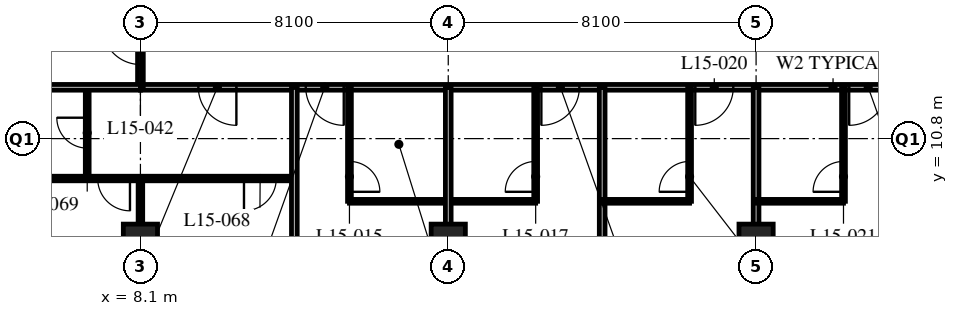
"""IFC4 building model, lengths in metres.
Left out: names, types, materials, properties, quantities, classifications, styles, units other than length and angle.
Written with IfcOpenShell. Run it as: python <this file> out.ifc"""

import sys

from ifc_helpers import new_model, si_unit, direction, frame, frame_2d, origin, origin_2d, place, context, subcontext, project, spatial, rectangle, hollow_rectangle, extrude, element, fill, save


model = new_model("IFC4")
c1 = context("Model", 3, precision=1e-05, world=origin(), true_north=direction((0.0, 1.0)))
c2 = subcontext(c1, "Body", "Model", "MODEL_VIEW")
j1 = project(units=[si_unit("LENGTHUNIT", "METRE"), si_unit("PLANEANGLEUNIT", "RADIAN")], contexts=[c1])
p1 = place(None, origin())
s1 = spatial("IfcSite", under=j1, at=p1, CompositionType="ELEMENT")
p2 = place(p1, origin())
s2 = spatial("IfcBuilding", under=s1, at=p2, CompositionType="ELEMENT")
p3 = place(p2, frame((0.0, 0.0, 63.6)))
s3 = spatial("IfcBuildingStorey", under=s2, at=p3, CompositionType="ELEMENT", Elevation=63.6)
for number, where, z_axis, x_axis in (
    (1, (8.1, 8.1, 0.0), (0.0, 0.0, 1.0), (1.0, 0.0, 0.0)),
    (2, (16.2, 8.1, 0.0), (0.0, 0.0, 1.0), (1.0, 0.0, 0.0)),
    (3, (24.3, 8.1, 0.0), (0.0, 0.0, 1.0), (1.0, 0.0, 0.0)),
):
    element("IfcColumn", number, at=place(p3, frame(where, z_axis=z_axis, x_axis=x_axis)), inside=s3, PredefinedType="COLUMN", context=c2, shape_type="SweptSolid", body=[
        extrude(hollow_rectangle(XDim=0.9, YDim=0.9, WallThickness=0.09, at=origin_2d()), origin(), (0.0, 0.0, 1.0), 3.4),
    ])
p4 = place(p3, frame((8.1, 12.15, 0.0), z_axis=(0.0, 0.0, 1.0), x_axis=(1.0, 0.0, 0.0)))
e4 = element("IfcWall", 4, at=p4, inside=s3, PredefinedType="PARTITIONING", context=c2, shape_type="SweptSolid", body=[
    extrude(rectangle(XDim=36.45, YDim=0.15, at=frame_2d((18.225, 0.0))), origin(), (0.0, 0.0, 1.0), 3.19),
])
p5 = place(p4, frame((4.35, 0.0, 0.0)))
e5 = element("IfcOpeningElement", 5, at=p5, cuts=e4, PredefinedType="OPENING", context=c2, shape_type="SweptSolid", body=[
    extrude(rectangle(XDim=1.0, YDim=2.1, at=frame_2d((0.5, 1.05))), frame((0.0, 0.085, 0.0), z_axis=(0.0, -1.0, 0.0), x_axis=(1.0, 0.0, 0.0)), (0.0, 0.0, 1.0), 0.17),
])
p6 = place(p4, frame((10.55, 0.0, 0.0)))
e6 = element("IfcOpeningElement", 6, at=p6, cuts=e4, PredefinedType="OPENING", context=c2, shape_type="SweptSolid", body=[
    extrude(rectangle(XDim=1.0, YDim=2.1, at=frame_2d((0.5, 1.05))), frame((0.0, 0.085, 0.0), z_axis=(0.0, -1.0, 0.0), x_axis=(1.0, 0.0, 0.0)), (0.0, 0.0, 1.0), 0.17),
])
p7 = place(p4, frame((14.6, 0.0, 0.0)))
e7 = element("IfcOpeningElement", 7, at=p7, cuts=e4, PredefinedType="OPENING", context=c2, shape_type="SweptSolid", body=[
    extrude(rectangle(XDim=1.0, YDim=2.1, at=frame_2d((0.5, 1.05))), frame((0.0, 0.085, 0.0), z_axis=(0.0, -1.0, 0.0), x_axis=(1.0, 0.0, 0.0)), (0.0, 0.0, 1.0), 0.17),
])
p8 = place(p4, frame((18.65, 0.0, 0.0)))
e8 = element("IfcOpeningElement", 8, at=p8, cuts=e4, PredefinedType="OPENING", context=c2, shape_type="SweptSolid", body=[
    extrude(rectangle(XDim=1.0, YDim=2.1, at=frame_2d((0.5, 1.05))), frame((0.0, 0.085, 0.0), z_axis=(0.0, -1.0, 0.0), x_axis=(1.0, 0.0, 0.0)), (0.0, 0.0, 1.0), 0.17),
])
p9 = place(p4, frame((22.7, 0.0, 0.0)))
e9 = element("IfcOpeningElement", 9, at=p9, cuts=e4, PredefinedType="OPENING", context=c2, shape_type="SweptSolid", body=[
    extrude(rectangle(XDim=1.0, YDim=2.1, at=frame_2d((0.5, 1.05))), frame((0.0, 0.085, 0.0), z_axis=(0.0, -1.0, 0.0), x_axis=(1.0, 0.0, 0.0)), (0.0, 0.0, 1.0), 0.17),
])
p10 = place(p4, frame((24.6, 0.0, 0.0)))
e10 = element("IfcOpeningElement", 10, at=p10, cuts=e4, PredefinedType="OPENING", context=c2, shape_type="SweptSolid", body=[
    extrude(rectangle(XDim=1.0, YDim=2.1, at=frame_2d((0.5, 1.05))), frame((0.0, 0.085, 0.0), z_axis=(0.0, -1.0, 0.0), x_axis=(1.0, 0.0, 0.0)), (0.0, 0.0, 1.0), 0.17),
])
p11 = place(p4, frame((30.8, 0.0, 0.0)))
e11 = element("IfcOpeningElement", 11, at=p11, cuts=e4, PredefinedType="OPENING", context=c2, shape_type="SweptSolid", body=[
    extrude(rectangle(XDim=1.0, YDim=2.1, at=frame_2d((0.5, 1.05))), frame((0.0, 0.085, 0.0), z_axis=(0.0, -1.0, 0.0), x_axis=(1.0, 0.0, 0.0)), (0.0, 0.0, 1.0), 0.17),
])
p12 = place(p4, frame((1.525, 0.0, 0.0)))
e12 = element("IfcOpeningElement", 12, at=p12, cuts=e4, PredefinedType="OPENING", context=c2, shape_type="SweptSolid", body=[
    extrude(rectangle(XDim=1.0, YDim=2.1, at=frame_2d((0.5, 1.05))), frame((0.0, 0.085, 0.0), z_axis=(0.0, -1.0, 0.0), x_axis=(1.0, 0.0, 0.0)), (0.0, 0.0, 1.0), 0.17),
])
p13 = place(p4, frame((33.925, 0.0, 0.0)))
e13 = element("IfcOpeningElement", 13, at=p13, cuts=e4, PredefinedType="OPENING", context=c2, shape_type="SweptSolid", body=[
    extrude(rectangle(XDim=1.0, YDim=2.1, at=frame_2d((0.5, 1.05))), frame((0.0, 0.085, 0.0), z_axis=(0.0, -1.0, 0.0), x_axis=(1.0, 0.0, 0.0)), (0.0, 0.0, 1.0), 0.17),
])
p14 = place(p3, frame((8.1, 12.15, 0.0), z_axis=(0.0, 0.0, 1.0), x_axis=(0.0, 1.0, 0.0)))
e14 = element("IfcWall", 14, at=p14, inside=s3, PredefinedType="PARTITIONING", context=c2, shape_type="SweptSolid", body=[
    extrude(rectangle(XDim=30.15, YDim=0.15, at=frame_2d((15.075, 0.0))), origin(), (0.0, 0.0, 1.0), 2.578),
])
p15 = place(p14, frame((0.6, 0.0, 0.0)))
e15 = element("IfcOpeningElement", 15, at=p15, cuts=e14, PredefinedType="OPENING", context=c2, shape_type="SweptSolid", body=[
    extrude(rectangle(XDim=1.0, YDim=2.1, at=frame_2d((0.5, 1.05))), frame((0.0, 0.085, 0.0), z_axis=(0.0, -1.0, 0.0), x_axis=(1.0, 0.0, 0.0)), (0.0, 0.0, 1.0), 0.17),
])
p16 = place(p14, frame((6.8, 0.0, 0.0)))
e16 = element("IfcOpeningElement", 16, at=p16, cuts=e14, PredefinedType="OPENING", context=c2, shape_type="SweptSolid", body=[
    extrude(rectangle(XDim=1.0, YDim=2.1, at=frame_2d((0.5, 1.05))), frame((0.0, 0.085, 0.0), z_axis=(0.0, -1.0, 0.0), x_axis=(1.0, 0.0, 0.0)), (0.0, 0.0, 1.0), 0.17),
])
p17 = place(p14, frame((8.7, 0.0, 0.0)))
e17 = element("IfcOpeningElement", 17, at=p17, cuts=e14, PredefinedType="OPENING", context=c2, shape_type="SweptSolid", body=[
    extrude(rectangle(XDim=1.0, YDim=2.1, at=frame_2d((0.5, 1.05))), frame((0.0, 0.085, 0.0), z_axis=(0.0, -1.0, 0.0), x_axis=(1.0, 0.0, 0.0)), (0.0, 0.0, 1.0), 0.17),
])
p18 = place(p14, frame((14.6, 0.0, 0.0)))
e18 = element("IfcOpeningElement", 18, at=p18, cuts=e14, PredefinedType="OPENING", context=c2, shape_type="SweptSolid", body=[
    extrude(rectangle(XDim=1.0, YDim=2.1, at=frame_2d((0.5, 1.05))), frame((0.0, 0.085, 0.0), z_axis=(0.0, -1.0, 0.0), x_axis=(1.0, 0.0, 0.0)), (0.0, 0.0, 1.0), 0.17),
])
p19 = place(p14, frame((21.65, 0.0, 0.0)))
e19 = element("IfcOpeningElement", 19, at=p19, cuts=e14, PredefinedType="OPENING", context=c2, shape_type="SweptSolid", body=[
    extrude(rectangle(XDim=1.0, YDim=2.1, at=frame_2d((0.5, 1.05))), frame((0.0, 0.085, 0.0), z_axis=(0.0, -1.0, 0.0), x_axis=(1.0, 0.0, 0.0)), (0.0, 0.0, 1.0), 0.17),
])
p20 = place(p14, frame((26.75, 0.0, 0.0)))
e20 = element("IfcOpeningElement", 20, at=p20, cuts=e14, PredefinedType="OPENING", context=c2, shape_type="SweptSolid", body=[
    extrude(rectangle(XDim=1.0, YDim=2.1, at=frame_2d((0.5, 1.05))), frame((0.0, 0.085, 0.0), z_axis=(0.0, -1.0, 0.0), x_axis=(1.0, 0.0, 0.0)), (0.0, 0.0, 1.0), 0.17),
])
p21 = place(p3, frame((13.6, 9.15, 0.0), z_axis=(0.0, 0.0, 1.0), x_axis=(1.0, 0.0, 0.0)))
e21 = element("IfcWall", 21, at=p21, inside=s3, PredefinedType="PARTITIONING", context=c2, shape_type="SweptSolid", body=[
    extrude(rectangle(XDim=4.9, YDim=0.1, at=frame_2d((2.45, 0.0))), origin(), (0.0, 0.0, 1.0), 3.19),
])
p22 = place(p3, frame((13.6, 12.15, 0.0), z_axis=(0.0, 0.0, 1.0), x_axis=(0.0, -1.0, 0.0)))
e22 = element("IfcWall", 22, at=p22, inside=s3, PredefinedType="PARTITIONING", context=c2, shape_type="SweptSolid", body=[
    extrude(rectangle(XDim=3.0, YDim=0.1, at=frame_2d((1.5, 0.0))), origin(), (0.0, 0.0, 1.0), 3.19),
])
p23 = place(p22, frame((1.95, 0.0, 0.0)))
e23 = element("IfcOpeningElement", 23, at=p23, cuts=e22, PredefinedType="OPENING", context=c2, shape_type="SweptSolid", body=[
    extrude(rectangle(XDim=0.8, YDim=2.1, at=frame_2d((0.4, 1.05))), frame((0.0, 0.06, 0.0), z_axis=(0.0, -1.0, 0.0), x_axis=(1.0, 0.0, 0.0)), (0.0, 0.0, 1.0), 0.12),
])
p24 = place(p3, frame((16.2, 12.15, 0.0), z_axis=(0.0, 0.0, 1.0), x_axis=(0.0, -1.0, 0.0)))
e24 = element("IfcWall", 24, at=p24, inside=s3, PredefinedType="PARTITIONING", context=c2, shape_type="SweptSolid", body=[
    extrude(rectangle(XDim=11.85, YDim=0.15, at=frame_2d((5.925, 0.0))), origin(), (0.0, 0.0, 1.0), 2.578),
])
p25 = place(p3, frame((18.5, 12.15, 0.0), z_axis=(0.0, 0.0, 1.0), x_axis=(0.0, -1.0, 0.0)))
e25 = element("IfcWall", 25, at=p25, inside=s3, PredefinedType="PARTITIONING", context=c2, shape_type="SweptSolid", body=[
    extrude(rectangle(XDim=3.0, YDim=0.1, at=frame_2d((1.5, 0.0))), origin(), (0.0, 0.0, 1.0), 3.19),
])
p26 = place(p25, frame((1.95, 0.0, 0.0)))
e26 = element("IfcOpeningElement", 26, at=p26, cuts=e25, PredefinedType="OPENING", context=c2, shape_type="SweptSolid", body=[
    extrude(rectangle(XDim=0.8, YDim=2.1, at=frame_2d((0.4, 1.05))), frame((0.0, 0.06, 0.0), z_axis=(0.0, -1.0, 0.0), x_axis=(1.0, 0.0, 0.0)), (0.0, 0.0, 1.0), 0.12),
])
p27 = place(p3, frame((20.25, 12.15, 0.0), z_axis=(0.0, 0.0, 1.0), x_axis=(0.0, -1.0, 0.0)))
e27 = element("IfcWall", 27, at=p27, inside=s3, PredefinedType="PARTITIONING", context=c2, shape_type="SweptSolid", body=[
    extrude(rectangle(XDim=11.85, YDim=0.15, at=frame_2d((5.925, 0.0))), origin(), (0.0, 0.0, 1.0), 3.19),
])
p28 = place(p3, frame((20.25, 9.15, 0.0), z_axis=(0.0, 0.0, 1.0), x_axis=(1.0, 0.0, 0.0)))
e28 = element("IfcWall", 28, at=p28, inside=s3, PredefinedType="PARTITIONING", context=c2, shape_type="SweptSolid", body=[
    extrude(rectangle(XDim=2.3, YDim=0.1, at=frame_2d((1.15, 0.0))), origin(), (0.0, 0.0, 1.0), 3.19),
])
p29 = place(p3, frame((22.55, 12.15, 0.0), z_axis=(0.0, 0.0, 1.0), x_axis=(0.0, -1.0, 0.0)))
e29 = element("IfcWall", 29, at=p29, inside=s3, PredefinedType="PARTITIONING", context=c2, shape_type="SweptSolid", body=[
    extrude(rectangle(XDim=3.0, YDim=0.1, at=frame_2d((1.5, 0.0))), origin(), (0.0, 0.0, 1.0), 3.19),
])
p30 = place(p29, frame((1.95, 0.0, 0.0)))
e30 = element("IfcOpeningElement", 30, at=p30, cuts=e29, PredefinedType="OPENING", context=c2, shape_type="SweptSolid", body=[
    extrude(rectangle(XDim=0.8, YDim=2.1, at=frame_2d((0.4, 1.05))), frame((0.0, 0.06, 0.0), z_axis=(0.0, -1.0, 0.0), x_axis=(1.0, 0.0, 0.0)), (0.0, 0.0, 1.0), 0.12),
])
p31 = place(p3, frame((24.3, 12.15, 0.0), z_axis=(0.0, 0.0, 1.0), x_axis=(0.0, -1.0, 0.0)))
e31 = element("IfcWall", 31, at=p31, inside=s3, PredefinedType="PARTITIONING", context=c2, shape_type="SweptSolid", body=[
    extrude(rectangle(XDim=11.85, YDim=0.15, at=frame_2d((5.925, 0.0))), origin(), (0.0, 0.0, 1.0), 2.578),
])
p32 = place(p3, frame((24.3, 9.15, 0.0), z_axis=(0.0, 0.0, 1.0), x_axis=(1.0, 0.0, 0.0)))
e32 = element("IfcWall", 32, at=p32, inside=s3, PredefinedType="PARTITIONING", context=c2, shape_type="SweptSolid", body=[
    extrude(rectangle(XDim=2.3, YDim=0.1, at=frame_2d((1.15, 0.0))), origin(), (0.0, 0.0, 1.0), 3.19),
])
p33 = place(p3, frame((26.6, 12.15, 0.0), z_axis=(0.0, 0.0, 1.0), x_axis=(0.0, -1.0, 0.0)))
e33 = element("IfcWall", 33, at=p33, inside=s3, PredefinedType="PARTITIONING", context=c2, shape_type="SweptSolid", body=[
    extrude(rectangle(XDim=3.0, YDim=0.1, at=frame_2d((1.5, 0.0))), origin(), (0.0, 0.0, 1.0), 3.19),
])
p34 = place(p33, frame((1.95, 0.0, 0.0)))
e34 = element("IfcOpeningElement", 34, at=p34, cuts=e33, PredefinedType="OPENING", context=c2, shape_type="SweptSolid", body=[
    extrude(rectangle(XDim=0.8, YDim=2.1, at=frame_2d((0.4, 1.05))), frame((0.0, 0.06, 0.0), z_axis=(0.0, -1.0, 0.0), x_axis=(1.0, 0.0, 0.0)), (0.0, 0.0, 1.0), 0.12),
])
p35 = place(p3, frame((6.7, 12.15, 0.0), z_axis=(0.0, 0.0, 1.0), x_axis=(0.0, -1.0, 0.0)))
e35 = element("IfcWall", 35, at=p35, inside=s3, PredefinedType="PARTITIONING", context=c2, shape_type="SweptSolid", body=[
    extrude(rectangle(XDim=2.4, YDim=0.1, at=frame_2d((1.2, 0.0))), origin(), (0.0, 0.0, 1.0), 3.19),
])
p36 = place(p35, frame((0.8, 0.0, 0.0)))
e36 = element("IfcOpeningElement", 36, at=p36, cuts=e35, PredefinedType="OPENING", context=c2, shape_type="SweptSolid", body=[
    extrude(rectangle(XDim=0.8, YDim=2.1, at=frame_2d((0.4, 1.05))), frame((0.0, 0.06, 0.0), z_axis=(0.0, -1.0, 0.0), x_axis=(1.0, 0.0, 0.0)), (0.0, 0.0, 1.0), 0.12),
])
p37 = place(p3, frame((4.1, 9.75, 0.0), z_axis=(0.0, 0.0, 1.0), x_axis=(1.0, 0.0, 0.0)))
e37 = element("IfcWall", 37, at=p37, inside=s3, PredefinedType="PARTITIONING", context=c2, shape_type="SweptSolid", body=[
    extrude(rectangle(XDim=8.05, YDim=0.12, at=frame_2d((4.025, 0.0))), origin(), (0.0, 0.0, 1.0), 3.19),
])
p38 = place(p37, frame((6.725, 0.0, 0.0)))
e38 = element("IfcOpeningElement", 38, at=p38, cuts=e37, PredefinedType="OPENING", context=c2, shape_type="SweptSolid", body=[
    extrude(rectangle(XDim=0.85, YDim=2.1, at=frame_2d((0.425, 1.05))), frame((0.0, 0.07, 0.0), z_axis=(0.0, -1.0, 0.0), x_axis=(1.0, 0.0, 0.0)), (0.0, 0.0, 1.0), 0.14),
])
p39 = place(p37, frame((2.875, 0.0, 0.0)))
e39 = element("IfcOpeningElement", 39, at=p39, cuts=e37, PredefinedType="OPENING", context=c2, shape_type="SweptSolid", body=[
    extrude(rectangle(XDim=0.85, YDim=2.1, at=frame_2d((0.425, 1.05))), frame((0.0, 0.07, 0.0), z_axis=(0.0, -1.0, 0.0), x_axis=(1.0, 0.0, 0.0)), (0.0, 0.0, 1.0), 0.14),
])
p40 = place(p3, frame((8.1, 9.75, 0.0), z_axis=(0.0, 0.0, 1.0), x_axis=(0.0, -1.0, 0.0)))
e40 = element("IfcWall", 40, at=p40, inside=s3, PredefinedType="PARTITIONING", context=c2, shape_type="SweptSolid", body=[
    extrude(rectangle(XDim=5.4, YDim=0.12, at=frame_2d((2.7, 0.0))), origin(), (0.0, 0.0, 1.0), 2.578),
])
p41 = place(p3, frame((0.3, 12.15, 0.0), z_axis=(0.0, 0.0, 1.0), x_axis=(1.0, 0.0, 0.0)))
e41 = element("IfcWall", 41, at=p41, inside=s3, PredefinedType="PARTITIONING", context=c2, shape_type="SweptSolid", body=[
    extrude(rectangle(XDim=7.8, YDim=0.15, at=frame_2d((3.9, 0.0))), origin(), (0.0, 0.0, 1.0), 3.19),
])
p42 = place(p3, frame((12.15, 12.15, 0.0), z_axis=(0.0, 0.0, 1.0), x_axis=(0.0, -1.0, 0.0)))
e42 = element("IfcWall", 42, at=p42, inside=s3, PredefinedType="PARTITIONING", context=c2, shape_type="SweptSolid", body=[
    extrude(rectangle(XDim=11.85, YDim=0.15, at=frame_2d((5.925, 0.0))), origin(), (0.0, 0.0, 1.0), 3.19),
])
p43 = place(p23, origin())
e43 = element("IfcDoor", 43, at=p43, inside=s3, OperationType="SINGLE_SWING_RIGHT", PredefinedType="DOOR", context=c2, shape_type="SweptSolid", body=[
    extrude(rectangle(XDim=0.8, YDim=2.1, at=frame_2d((0.4, 1.05))), frame((0.0, 0.025, 0.0), z_axis=(0.0, -1.0, 0.0), x_axis=(1.0, 0.0, 0.0)), (0.0, 0.0, 1.0), 0.05),
])
fill(e23, e43)
p44 = place(p5, origin())
e44 = element("IfcDoor", 44, at=p44, inside=s3, OperationType="SINGLE_SWING_LEFT", PredefinedType="DOOR", context=c2, shape_type="SweptSolid", body=[
    extrude(rectangle(XDim=1.0, YDim=2.1, at=frame_2d((0.5, 1.05))), frame((0.0, 0.025, 0.0), z_axis=(0.0, -1.0, 0.0), x_axis=(1.0, 0.0, 0.0)), (0.0, 0.0, 1.0), 0.05),
])
fill(e5, e44)
p45 = place(p26, origin())
e45 = element("IfcDoor", 45, at=p45, inside=s3, OperationType="SINGLE_SWING_LEFT", PredefinedType="DOOR", context=c2, shape_type="SweptSolid", body=[
    extrude(rectangle(XDim=0.8, YDim=2.1, at=frame_2d((0.4, 1.05))), frame((0.0, 0.025, 0.0), z_axis=(0.0, -1.0, 0.0), x_axis=(1.0, 0.0, 0.0)), (0.0, 0.0, 1.0), 0.05),
])
fill(e26, e45)
p46 = place(p6, origin())
e46 = element("IfcDoor", 46, at=p46, inside=s3, OperationType="SINGLE_SWING_RIGHT", PredefinedType="DOOR", context=c2, shape_type="SweptSolid", body=[
    extrude(rectangle(XDim=1.0, YDim=2.1, at=frame_2d((0.5, 1.05))), frame((0.0, 0.025, 0.0), z_axis=(0.0, -1.0, 0.0), x_axis=(1.0, 0.0, 0.0)), (0.0, 0.0, 1.0), 0.05),
])
fill(e6, e46)
p47 = place(p30, origin())
e47 = element("IfcDoor", 47, at=p47, inside=s3, OperationType="SINGLE_SWING_LEFT", PredefinedType="DOOR", context=c2, shape_type="SweptSolid", body=[
    extrude(rectangle(XDim=0.8, YDim=2.1, at=frame_2d((0.4, 1.05))), frame((0.0, 0.025, 0.0), z_axis=(0.0, -1.0, 0.0), x_axis=(1.0, 0.0, 0.0)), (0.0, 0.0, 1.0), 0.05),
])
fill(e30, e47)
p48 = place(p7, origin())
e48 = element("IfcDoor", 48, at=p48, inside=s3, OperationType="SINGLE_SWING_RIGHT", PredefinedType="DOOR", context=c2, shape_type="SweptSolid", body=[
    extrude(rectangle(XDim=1.0, YDim=2.1, at=frame_2d((0.5, 1.05))), frame((0.0, 0.025, 0.0), z_axis=(0.0, -1.0, 0.0), x_axis=(1.0, 0.0, 0.0)), (0.0, 0.0, 1.0), 0.05),
])
fill(e7, e48)
p49 = place(p34, origin())
e49 = element("IfcDoor", 49, at=p49, inside=s3, OperationType="SINGLE_SWING_LEFT", PredefinedType="DOOR", context=c2, shape_type="SweptSolid", body=[
    extrude(rectangle(XDim=0.8, YDim=2.1, at=frame_2d((0.4, 1.05))), frame((0.0, 0.025, 0.0), z_axis=(0.0, -1.0, 0.0), x_axis=(1.0, 0.0, 0.0)), (0.0, 0.0, 1.0), 0.05),
])
fill(e34, e49)
p50 = place(p8, origin())
e50 = element("IfcDoor", 50, at=p50, inside=s3, OperationType="SINGLE_SWING_RIGHT", PredefinedType="DOOR", context=c2, shape_type="SweptSolid", body=[
    extrude(rectangle(XDim=1.0, YDim=2.1, at=frame_2d((0.5, 1.05))), frame((0.0, 0.025, 0.0), z_axis=(0.0, -1.0, 0.0), x_axis=(1.0, 0.0, 0.0)), (0.0, 0.0, 1.0), 0.05),
])
fill(e8, e50)
p51 = place(p15, origin())
e51 = element("IfcDoor", 51, at=p51, inside=s3, OperationType="SINGLE_SWING_RIGHT", PredefinedType="DOOR", context=c2, shape_type="SweptSolid", body=[
    extrude(rectangle(XDim=1.0, YDim=2.1, at=frame_2d((0.5, 1.05))), frame((0.0, 0.025, 0.0), z_axis=(0.0, -1.0, 0.0), x_axis=(1.0, 0.0, 0.0)), (0.0, 0.0, 1.0), 0.05),
])
fill(e15, e51)
p52 = place(p12, origin())
e52 = element("IfcDoor", 52, at=p52, inside=s3, OperationType="SINGLE_SWING_LEFT", PredefinedType="DOOR", context=c2, shape_type="SweptSolid", body=[
    extrude(rectangle(XDim=1.0, YDim=2.1, at=frame_2d((0.5, 1.05))), frame((0.0, 0.025, 0.0), z_axis=(0.0, -1.0, 0.0), x_axis=(1.0, 0.0, 0.0)), (0.0, 0.0, 1.0), 0.05),
])
fill(e12, e52)
p53 = place(p38, origin())
e53 = element("IfcDoor", 53, at=p53, inside=s3, OperationType="SINGLE_SWING_RIGHT", PredefinedType="DOOR", context=c2, shape_type="SweptSolid", body=[
    extrude(rectangle(XDim=0.85, YDim=2.1, at=frame_2d((0.425, 1.05))), frame((0.0, 0.025, 0.0), z_axis=(0.0, -1.0, 0.0), x_axis=(1.0, 0.0, 0.0)), (0.0, 0.0, 1.0), 0.05),
])
fill(e38, e53)
p54 = place(p36, origin())
e54 = element("IfcDoor", 54, at=p54, inside=s3, OperationType="SINGLE_SWING_RIGHT", PredefinedType="DOOR", context=c2, shape_type="SweptSolid", body=[
    extrude(rectangle(XDim=0.8, YDim=2.1, at=frame_2d((0.4, 1.05))), frame((0.0, 0.025, 0.0), z_axis=(0.0, -1.0, 0.0), x_axis=(1.0, 0.0, 0.0)), (0.0, 0.0, 1.0), 0.05),
])
fill(e36, e54)
p55 = place(p39, origin())
e55 = element("IfcDoor", 55, at=p55, inside=s3, OperationType="SINGLE_SWING_LEFT", PredefinedType="DOOR", context=c2, shape_type="SweptSolid", body=[
    extrude(rectangle(XDim=0.85, YDim=2.1, at=frame_2d((0.425, 1.05))), frame((0.0, 0.025, 0.0), z_axis=(0.0, -1.0, 0.0), x_axis=(1.0, 0.0, 0.0)), (0.0, 0.0, 1.0), 0.05),
])
fill(e39, e55)
save(model, sys.argv[1])
